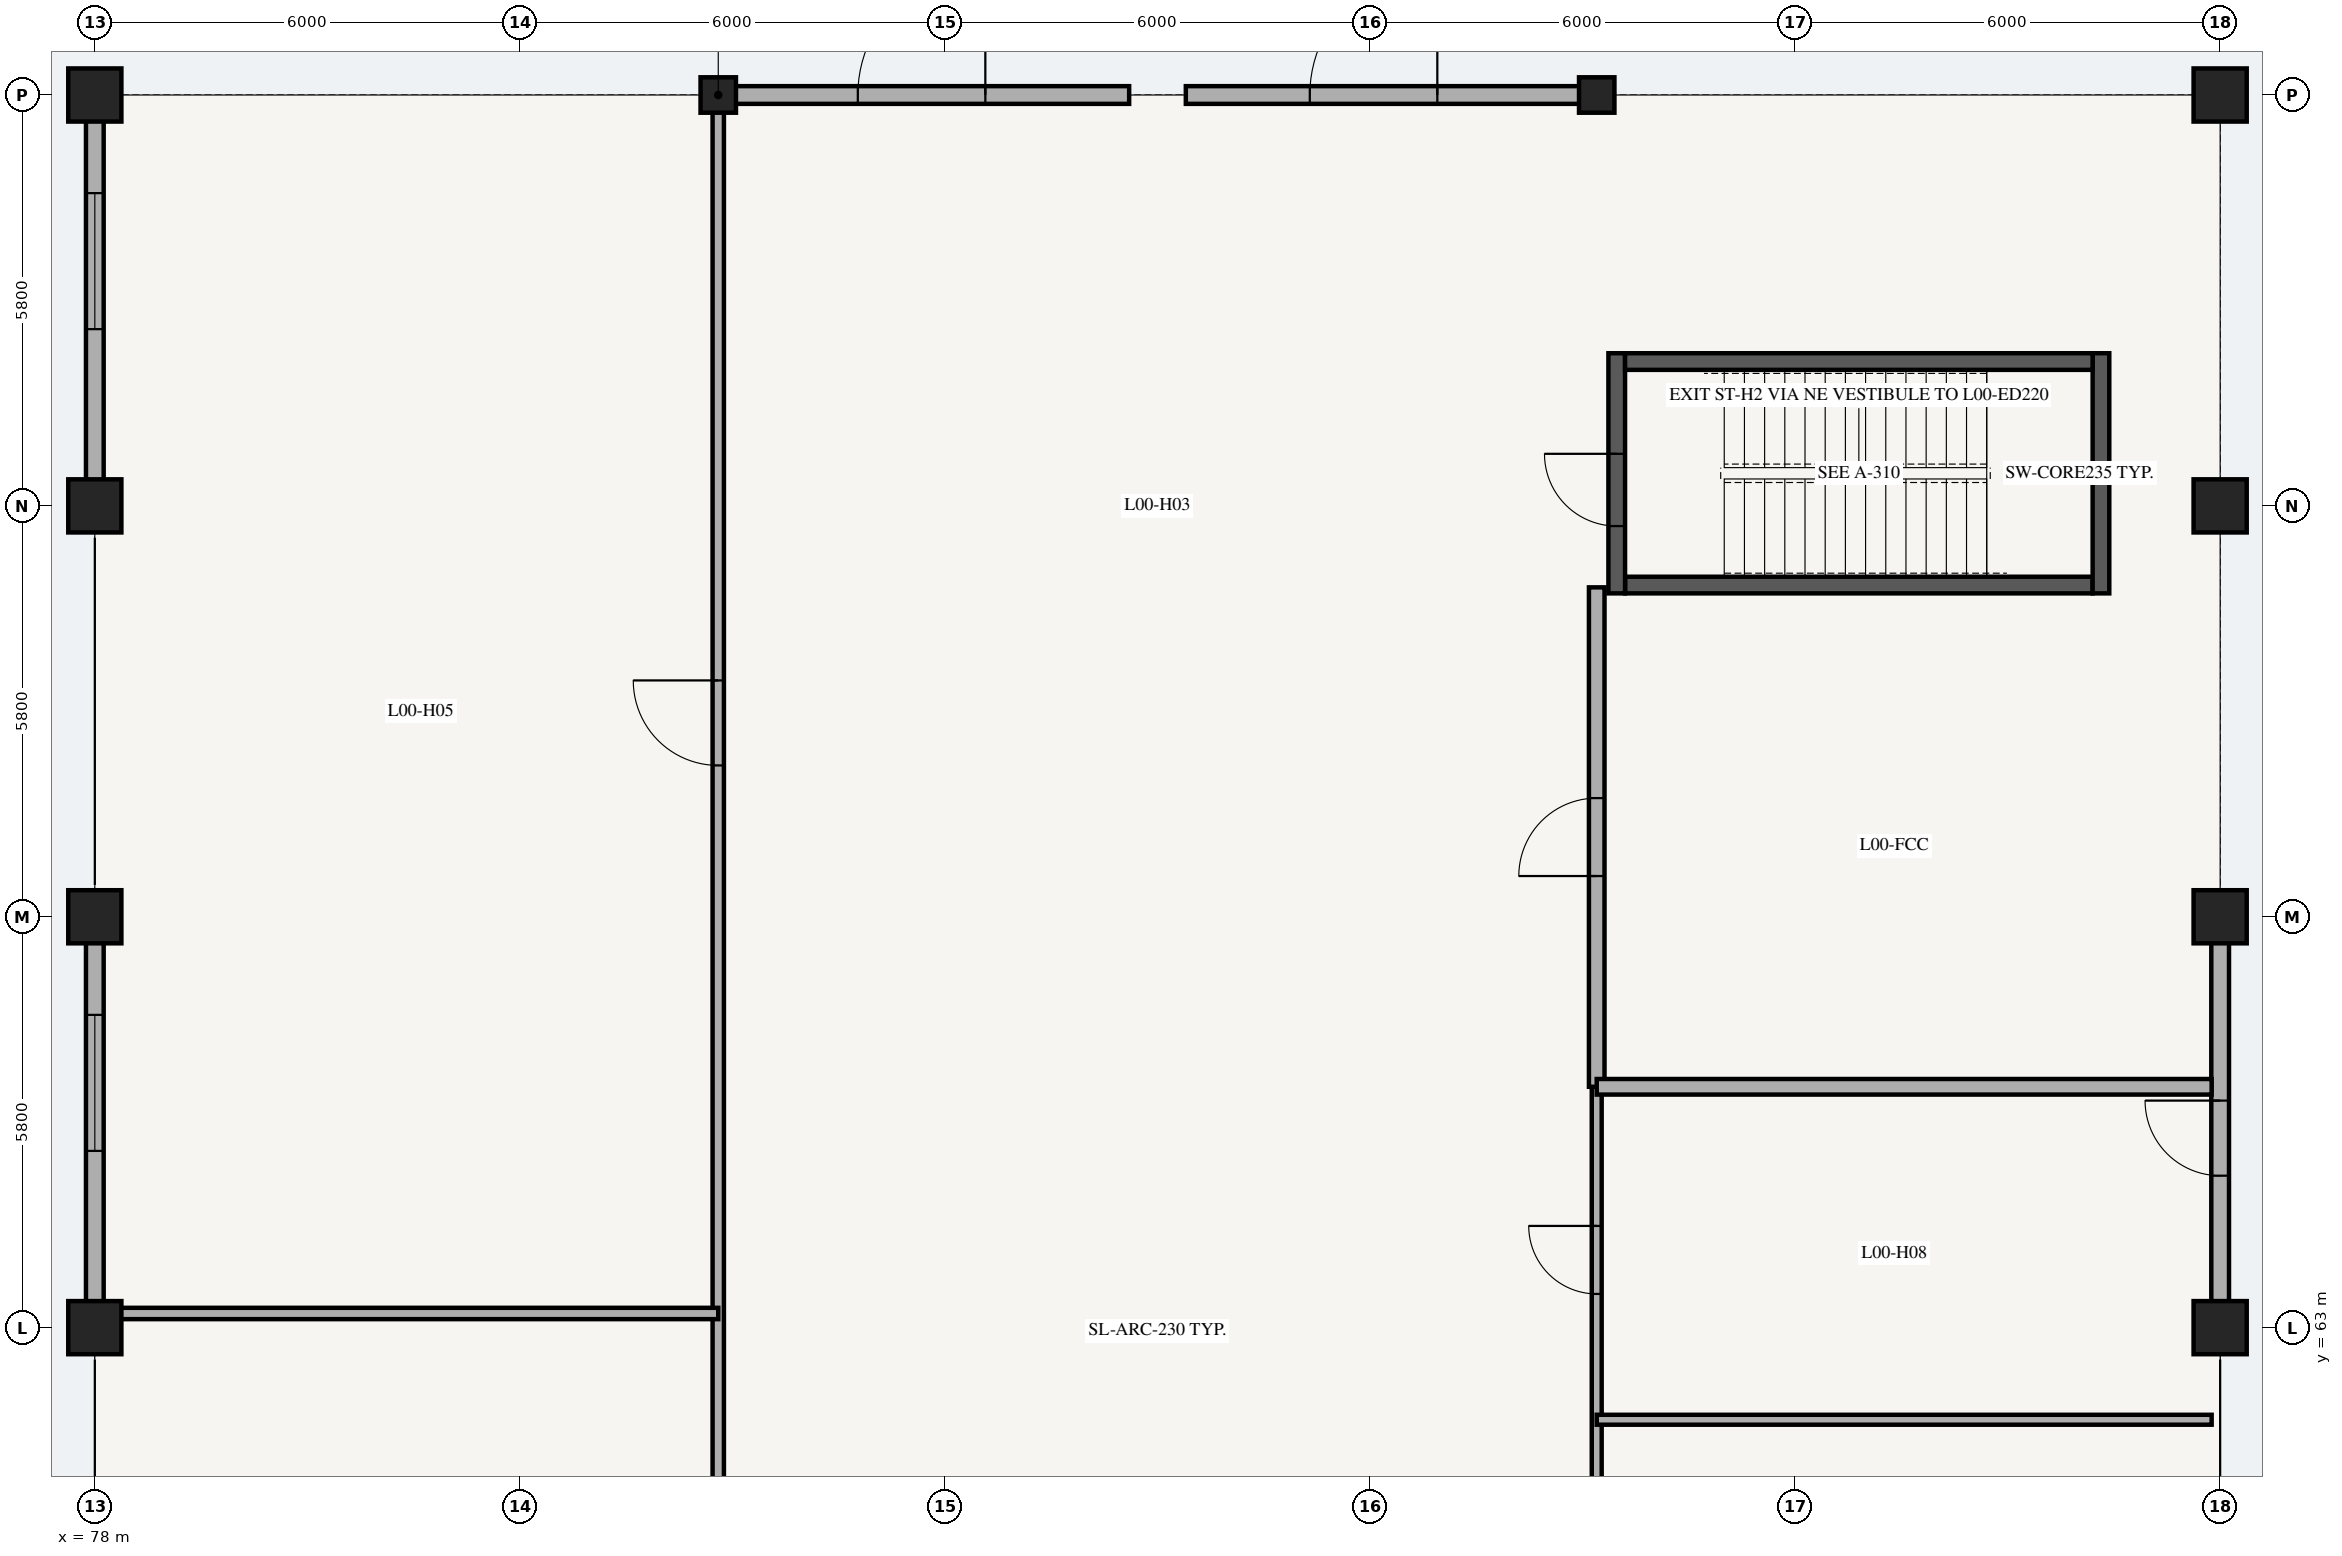
"""IFC4 building model, lengths in metres.
Left out: names, types, materials, properties, quantities, classifications, styles, units other than length and angle.
Written with IfcOpenShell. Run it as: python <this file> out.ifc"""

import sys

from ifc_helpers import new_model, si_unit, direction, frame, frame_2d, origin, origin_2d, place, context, subcontext, project, spatial, rectangle, extrude, element, fill, save


model = new_model("IFC4")
c1 = context("Model", 3, precision=1e-05, world=origin(), true_north=direction((0.0, 1.0)))
c2 = subcontext(c1, "Body", "Model", "MODEL_VIEW")
j1 = project(units=[si_unit("LENGTHUNIT", "METRE"), si_unit("PLANEANGLEUNIT", "RADIAN")], contexts=[c1])
p1 = place(None, origin())
s1 = spatial("IfcSite", under=j1, at=p1, CompositionType="ELEMENT")
p2 = place(p1, origin())
s2 = spatial("IfcBuilding", under=s1, at=p2, CompositionType="ELEMENT")
p3 = place(p2, origin())
s3 = spatial("IfcBuildingStorey", under=s2, at=p3, CompositionType="ELEMENT", Elevation=0.0)
p4 = place(p3, frame((99.6, 73.482, 0.0), z_axis=(0.0, 0.0, 1.0), x_axis=(1.0, 0.0, 0.0)))
e1 = element("IfcWall", 1, at=p4, inside=s3, PredefinedType="SHEAR", context=c2, shape_type="SweptSolid", body=[
    extrude(rectangle(XDim=6.6, YDim=0.235, at=frame_2d((3.3, 0.0))), origin(), (0.0, 0.0, 1.0), 4.465),
])
p5 = place(p3, frame((106.317, 73.365, 0.0), z_axis=(0.0, 0.0, 1.0), x_axis=(0.0, 1.0, 0.0)))
e2 = element("IfcWall", 2, at=p5, inside=s3, PredefinedType="SHEAR", context=c2, shape_type="SweptSolid", body=[
    extrude(rectangle(XDim=3.39, YDim=0.235, at=frame_2d((1.695, 0.0))), origin(), (0.0, 0.0, 1.0), 4.465),
])
p6 = place(p3, frame((99.482, 73.365, 0.0), z_axis=(0.0, 0.0, 1.0), x_axis=(0.0, 1.0, 0.0)))
e3 = element("IfcWall", 3, at=p6, inside=s3, PredefinedType="SHEAR", context=c2, shape_type="SweptSolid", body=[
    extrude(rectangle(XDim=3.39, YDim=0.235, at=frame_2d((1.695, 0.0))), origin(), (0.0, 0.0, 1.0), 4.465),
])
p7 = place(p6, frame((0.95, 0.0, 0.0)))
e4 = element("IfcOpeningElement", 4, at=p7, cuts=e3, PredefinedType="OPENING", context=c2, shape_type="SweptSolid", body=[
    extrude(rectangle(XDim=1.02, YDim=2.14, at=frame_2d((0.51, 1.07))), frame((0.0, 0.127, 0.0), z_axis=(0.0, -1.0, 0.0), x_axis=(1.0, 0.0, 0.0)), (0.0, 0.0, 1.0), 0.255),
])
p8 = place(p3, frame((99.6, 76.637, 0.0), z_axis=(0.0, 0.0, 1.0), x_axis=(1.0, 0.0, 0.0)))
e5 = element("IfcWall", 5, at=p8, inside=s3, PredefinedType="SHEAR", context=c2, shape_type="SweptSolid", body=[
    extrude(rectangle(XDim=6.6, YDim=0.235, at=frame_2d((3.3, 0.0))), origin(), (0.0, 0.0, 1.0), 4.465),
])
for number, where, z_axis, x_axis in (
    (6, (78.0, 63.0, 0.0), (0.0, 0.0, 1.0), (1.0, 0.0, 0.0)),
    (7, (78.0, 68.8, 0.0), (0.0, 0.0, 1.0), (1.0, 0.0, 0.0)),
    (8, (78.0, 74.6, 0.0), (0.0, 0.0, 1.0), (1.0, 0.0, 0.0)),
    (9, (78.0, 80.4, 0.0), (0.0, 0.0, 1.0), (1.0, 0.0, 0.0)),
):
    element("IfcColumn", number, at=place(p3, frame(where, z_axis=z_axis, x_axis=x_axis)), inside=s3, PredefinedType="COLUMN", context=c2, shape_type="SweptSolid", body=[
        extrude(rectangle(XDim=0.75, YDim=0.75, at=origin_2d()), origin(), (0.0, 0.0, 1.0), 4.465),
    ])
for number, where, z_axis, x_axis in (
    (10, (86.8, 80.4, 0.0), (0.0, 0.0, 1.0), (1.0, 0.0, 0.0)),
    (11, (99.2, 80.4, 0.0), (0.0, 0.0, 1.0), (1.0, 0.0, 0.0)),
):
    element("IfcColumn", number, at=place(p3, frame(where, z_axis=z_axis, x_axis=x_axis)), inside=s3, PredefinedType="COLUMN", context=c2, shape_type="SweptSolid", body=[
        extrude(rectangle(XDim=0.5, YDim=0.5, at=origin_2d()), origin(), (0.0, 0.0, 1.0), 4.465),
    ])
for number, where, z_axis, x_axis in (
    (12, (108.0, 63.0, 0.0), (0.0, 0.0, 1.0), (1.0, 0.0, 0.0)),
    (13, (108.0, 68.8, 0.0), (0.0, 0.0, 1.0), (1.0, 0.0, 0.0)),
    (14, (108.0, 74.6, 0.0), (0.0, 0.0, 1.0), (1.0, 0.0, 0.0)),
    (15, (108.0, 80.4, 0.0), (0.0, 0.0, 1.0), (1.0, 0.0, 0.0)),
):
    element("IfcColumn", number, at=place(p3, frame(where, z_axis=z_axis, x_axis=x_axis)), inside=s3, PredefinedType="COLUMN", context=c2, shape_type="SweptSolid", body=[
        extrude(rectangle(XDim=0.75, YDim=0.75, at=origin_2d()), origin(), (0.0, 0.0, 1.0), 4.465),
    ])
p9 = place(p3, frame((78.0, 63.345, 0.0), z_axis=(0.0, 0.0, 1.0), x_axis=(0.0, 1.0, 0.0)))
e16 = element("IfcWall", 16, at=p9, inside=s3, PredefinedType="SOLIDWALL", context=c2, shape_type="SweptSolid", body=[
    extrude(rectangle(XDim=5.11, YDim=0.25, at=frame_2d((2.555, 0.0))), origin(), (0.0, 0.0, 1.0), 3.75),
])
p10 = place(p9, frame((2.15, 0.0, 0.6)))
e17 = element("IfcOpeningElement", 17, at=p10, cuts=e16, PredefinedType="OPENING", context=c2, shape_type="SweptSolid", body=[
    extrude(rectangle(XDim=1.92, YDim=2.15, at=frame_2d((0.96, 1.075))), frame((0.0, 0.135, 0.0), z_axis=(0.0, -1.0, 0.0), x_axis=(1.0, 0.0, 0.0)), (0.0, 0.0, 1.0), 0.27),
])
p11 = place(p3, frame((108.0, 63.345, 0.0), z_axis=(0.0, 0.0, 1.0), x_axis=(0.0, 1.0, 0.0)))
e18 = element("IfcWall", 18, at=p11, inside=s3, PredefinedType="SOLIDWALL", context=c2, shape_type="SweptSolid", body=[
    extrude(rectangle(XDim=5.11, YDim=0.25, at=frame_2d((2.555, 0.0))), origin(), (0.0, 0.0, 1.0), 3.75),
])
p12 = place(p11, frame((1.8, 0.0, 0.0)))
e19 = element("IfcOpeningElement", 19, at=p12, cuts=e18, PredefinedType="OPENING", context=c2, shape_type="SweptSolid", body=[
    extrude(rectangle(XDim=1.06, YDim=2.15, at=frame_2d((0.53, 1.075))), frame((0.0, 0.135, 0.0), z_axis=(0.0, -1.0, 0.0), x_axis=(1.0, 0.0, 0.0)), (0.0, 0.0, 1.0), 0.27),
])
p13 = place(p3, frame((78.0, 74.945, 0.0), z_axis=(0.0, 0.0, 1.0), x_axis=(0.0, 1.0, 0.0)))
e20 = element("IfcWall", 20, at=p13, inside=s3, PredefinedType="SOLIDWALL", context=c2, shape_type="SweptSolid", body=[
    extrude(rectangle(XDim=5.11, YDim=0.25, at=frame_2d((2.555, 0.0))), origin(), (0.0, 0.0, 1.0), 3.75),
])
p14 = place(p13, frame((2.15, 0.0, 0.6)))
e21 = element("IfcOpeningElement", 21, at=p14, cuts=e20, PredefinedType="OPENING", context=c2, shape_type="SweptSolid", body=[
    extrude(rectangle(XDim=1.92, YDim=2.15, at=frame_2d((0.96, 1.075))), frame((0.0, 0.135, 0.0), z_axis=(0.0, -1.0, 0.0), x_axis=(1.0, 0.0, 0.0)), (0.0, 0.0, 1.0), 0.27),
])
p15 = place(p3, frame((87.02, 80.4, 0.0), z_axis=(0.0, 0.0, 1.0), x_axis=(1.0, 0.0, 0.0)))
e22 = element("IfcWall", 22, at=p15, inside=s3, PredefinedType="SOLIDWALL", context=c2, shape_type="SweptSolid", body=[
    extrude(rectangle(XDim=5.58, YDim=0.25, at=frame_2d((2.79, 0.0))), origin(), (0.0, 0.0, 1.0), 3.75),
])
p16 = place(p15, frame((1.75, 0.0, 0.0)))
e23 = element("IfcOpeningElement", 23, at=p16, cuts=e22, PredefinedType="OPENING", context=c2, shape_type="SweptSolid", body=[
    extrude(rectangle(XDim=1.8, YDim=2.3, at=frame_2d((0.9, 1.15))), frame((0.0, 0.135, 0.0), z_axis=(0.0, -1.0, 0.0), x_axis=(1.0, 0.0, 0.0)), (0.0, 0.0, 1.0), 0.27),
])
p17 = place(p3, frame((93.4, 80.4, 0.0), z_axis=(0.0, 0.0, 1.0), x_axis=(1.0, 0.0, 0.0)))
e24 = element("IfcWall", 24, at=p17, inside=s3, PredefinedType="SOLIDWALL", context=c2, shape_type="SweptSolid", body=[
    extrude(rectangle(XDim=5.58, YDim=0.25, at=frame_2d((2.79, 0.0))), origin(), (0.0, 0.0, 1.0), 3.75),
])
p18 = place(p17, frame((1.75, 0.0, 0.0)))
e25 = element("IfcOpeningElement", 25, at=p18, cuts=e24, PredefinedType="OPENING", context=c2, shape_type="SweptSolid", body=[
    extrude(rectangle(XDim=1.8, YDim=2.3, at=frame_2d((0.9, 1.15))), frame((0.0, 0.135, 0.0), z_axis=(0.0, -1.0, 0.0), x_axis=(1.0, 0.0, 0.0)), (0.0, 0.0, 1.0), 0.27),
])
p19 = place(p3, frame((86.8, 46.65, 0.0), z_axis=(0.0, 0.0, 1.0), x_axis=(0.0, 1.0, 0.0)))
e26 = element("IfcWall", 26, at=p19, inside=s3, PredefinedType="PARTITIONING", context=c2, shape_type="SweptSolid", body=[
    extrude(rectangle(XDim=33.63, YDim=0.16, at=frame_2d((16.815, 0.0))), origin(), (0.0, 0.0, 1.0), 3.52),
])
p20 = place(p19, frame((8.816, 0.0, 0.0)))
e27 = element("IfcOpeningElement", 27, at=p20, cuts=e26, PredefinedType="OPENING", context=c2, shape_type="SweptSolid", body=[
    extrude(rectangle(XDim=1.2, YDim=2.15, at=frame_2d((0.6, 1.075))), frame((0.0, 0.09, 0.0), z_axis=(0.0, -1.0, 0.0), x_axis=(1.0, 0.0, 0.0)), (0.0, 0.0, 1.0), 0.18),
])
p21 = place(p19, frame((24.286, 0.0, 0.0)))
e28 = element("IfcOpeningElement", 28, at=p21, cuts=e26, PredefinedType="OPENING", context=c2, shape_type="SweptSolid", body=[
    extrude(rectangle(XDim=1.2, YDim=2.15, at=frame_2d((0.6, 1.075))), frame((0.0, 0.09, 0.0), z_axis=(0.0, -1.0, 0.0), x_axis=(1.0, 0.0, 0.0)), (0.0, 0.0, 1.0), 0.18),
])
p22 = place(p3, frame((99.2, 47.6, 0.0), z_axis=(0.0, 0.0, 1.0), x_axis=(0.0, 1.0, 0.0)))
e29 = element("IfcWall", 29, at=p22, inside=s3, PredefinedType="PLUMBINGWALL", context=c2, shape_type="SweptSolid", body=[
    extrude(rectangle(XDim=18.8, YDim=0.14, at=frame_2d((9.4, 0.0))), origin(), (0.0, 0.0, 1.0), 3.52),
])
p23 = place(p22, frame((3.142, 0.0, 0.0)))
e30 = element("IfcOpeningElement", 30, at=p23, cuts=e29, PredefinedType="OPENING", context=c2, shape_type="SweptSolid", body=[
    extrude(rectangle(XDim=0.86, YDim=2.06, at=frame_2d((0.43, 1.03))), frame((0.0, 0.08, 0.0), z_axis=(0.0, -1.0, 0.0), x_axis=(1.0, 0.0, 0.0)), (0.0, 0.0, 1.0), 0.16),
])
p24 = place(p22, frame((10.286, 0.0, 0.0)))
e31 = element("IfcOpeningElement", 31, at=p24, cuts=e29, PredefinedType="OPENING", context=c2, shape_type="SweptSolid", body=[
    extrude(rectangle(XDim=0.86, YDim=2.06, at=frame_2d((0.43, 1.03))), frame((0.0, 0.08, 0.0), z_axis=(0.0, -1.0, 0.0), x_axis=(1.0, 0.0, 0.0)), (0.0, 0.0, 1.0), 0.16),
])
p25 = place(p22, frame((15.876, 0.0, 0.0)))
e32 = element("IfcOpeningElement", 32, at=p25, cuts=e29, PredefinedType="OPENING", context=c2, shape_type="SweptSolid", body=[
    extrude(rectangle(XDim=0.96, YDim=2.1, at=frame_2d((0.48, 1.05))), frame((0.0, 0.08, 0.0), z_axis=(0.0, -1.0, 0.0), x_axis=(1.0, 0.0, 0.0)), (0.0, 0.0, 1.0), 0.16),
])
p26 = place(p3, frame((99.2, 66.4, 0.0), z_axis=(0.0, 0.0, 1.0), x_axis=(0.0, 1.0, 0.0)))
e33 = element("IfcWall", 33, at=p26, inside=s3, PredefinedType="PARTITIONING", context=c2, shape_type="SweptSolid", body=[
    extrude(rectangle(XDim=7.05, YDim=0.22, at=frame_2d((3.525, 0.0))), origin(), (0.0, 0.0, 1.0), 3.52),
])
p27 = place(p26, frame((2.975, 0.0, 0.0)))
e34 = element("IfcOpeningElement", 34, at=p27, cuts=e33, PredefinedType="OPENING", context=c2, shape_type="SweptSolid", body=[
    extrude(rectangle(XDim=1.1, YDim=2.15, at=frame_2d((0.55, 1.075))), frame((0.0, 0.12, 0.0), z_axis=(0.0, -1.0, 0.0), x_axis=(1.0, 0.0, 0.0)), (0.0, 0.0, 1.0), 0.24),
])
p28 = place(p3, frame((99.2, 61.7, 0.0), z_axis=(0.0, 0.0, 1.0), x_axis=(1.0, 0.0, 0.0)))
e35 = element("IfcWall", 35, at=p28, inside=s3, PredefinedType="PLUMBINGWALL", context=c2, shape_type="SweptSolid", body=[
    extrude(rectangle(XDim=8.68, YDim=0.14, at=frame_2d((4.34, 0.0))), origin(), (0.0, 0.0, 1.0), 3.52),
])
p29 = place(p3, frame((99.2, 66.4, 0.0), z_axis=(0.0, 0.0, 1.0), x_axis=(1.0, 0.0, 0.0)))
e36 = element("IfcWall", 36, at=p29, inside=s3, PredefinedType="PARTITIONING", context=c2, shape_type="SweptSolid", body=[
    extrude(rectangle(XDim=8.68, YDim=0.22, at=frame_2d((4.34, 0.0))), origin(), (0.0, 0.0, 1.0), 3.52),
])
p30 = place(p3, frame((78.12, 63.2, 0.0), z_axis=(0.0, 0.0, 1.0), x_axis=(1.0, 0.0, 0.0)))
e37 = element("IfcWall", 37, at=p30, inside=s3, PredefinedType="PARTITIONING", context=c2, shape_type="SweptSolid", body=[
    extrude(rectangle(XDim=8.68, YDim=0.16, at=frame_2d((4.34, 0.0))), origin(), (0.0, 0.0, 1.0), 3.52),
])
p31 = place(p10, origin())
e38 = element("IfcWindow", 38, at=p31, inside=s3, PartitioningType="SINGLE_PANEL", PredefinedType="WINDOW", context=c2, shape_type="SweptSolid", body=[
    extrude(rectangle(XDim=1.92, YDim=2.15, at=frame_2d((0.96, 1.075))), frame((0.0, 0.03, 0.0), z_axis=(0.0, -1.0, 0.0), x_axis=(1.0, 0.0, 0.0)), (0.0, 0.0, 1.0), 0.06),
])
fill(e17, e38)
p32 = place(p12, origin())
e39 = element("IfcDoor", 39, at=p32, inside=s3, OperationType="SINGLE_SWING_RIGHT", PredefinedType="DOOR", context=c2, shape_type="SweptSolid", body=[
    extrude(rectangle(XDim=1.06, YDim=2.15, at=frame_2d((0.53, 1.075))), frame((0.0, 0.025, 0.0), z_axis=(0.0, -1.0, 0.0), x_axis=(1.0, 0.0, 0.0)), (0.0, 0.0, 1.0), 0.05),
])
fill(e19, e39)
p33 = place(p14, origin())
e40 = element("IfcWindow", 40, at=p33, inside=s3, PartitioningType="SINGLE_PANEL", PredefinedType="WINDOW", context=c2, shape_type="SweptSolid", body=[
    extrude(rectangle(XDim=1.92, YDim=2.15, at=frame_2d((0.96, 1.075))), frame((0.0, 0.03, 0.0), z_axis=(0.0, -1.0, 0.0), x_axis=(1.0, 0.0, 0.0)), (0.0, 0.0, 1.0), 0.06),
])
fill(e21, e40)
p34 = place(p16, origin())
e41 = element("IfcDoor", 41, at=p34, inside=s3, OperationType="DOUBLE_DOOR_SINGLE_SWING", PredefinedType="DOOR", context=c2, shape_type="SweptSolid", body=[
    extrude(rectangle(XDim=1.8, YDim=2.3, at=frame_2d((0.9, 1.15))), frame((0.0, 0.025, 0.0), z_axis=(0.0, -1.0, 0.0), x_axis=(1.0, 0.0, 0.0)), (0.0, 0.0, 1.0), 0.05),
])
fill(e23, e41)
p35 = place(p18, origin())
e42 = element("IfcDoor", 42, at=p35, inside=s3, OperationType="DOUBLE_DOOR_SINGLE_SWING", PredefinedType="DOOR", context=c2, shape_type="SweptSolid", body=[
    extrude(rectangle(XDim=1.8, YDim=2.3, at=frame_2d((0.9, 1.15))), frame((0.0, 0.025, 0.0), z_axis=(0.0, -1.0, 0.0), x_axis=(1.0, 0.0, 0.0)), (0.0, 0.0, 1.0), 0.05),
])
fill(e25, e42)
p36 = place(p7, origin())
e43 = element("IfcDoor", 43, at=p36, inside=s3, OperationType="SINGLE_SWING_RIGHT", PredefinedType="DOOR", context=c2, shape_type="SweptSolid", body=[
    extrude(rectangle(XDim=1.02, YDim=2.14, at=frame_2d((0.51, 1.07))), frame((0.0, 0.025, 0.0), z_axis=(0.0, -1.0, 0.0), x_axis=(1.0, 0.0, 0.0)), (0.0, 0.0, 1.0), 0.05),
])
fill(e4, e43)
p37 = place(p21, origin())
e44 = element("IfcDoor", 44, at=p37, inside=s3, OperationType="SINGLE_SWING_RIGHT", PredefinedType="DOOR", context=c2, shape_type="SweptSolid", body=[
    extrude(rectangle(XDim=1.2, YDim=2.15, at=frame_2d((0.6, 1.075))), frame((0.0, 0.025, 0.0), z_axis=(0.0, -1.0, 0.0), x_axis=(1.0, 0.0, 0.0)), (0.0, 0.0, 1.0), 0.05),
])
fill(e28, e44)
p38 = place(p25, origin())
e45 = element("IfcDoor", 45, at=p38, inside=s3, OperationType="SINGLE_SWING_RIGHT", PredefinedType="DOOR", context=c2, shape_type="SweptSolid", body=[
    extrude(rectangle(XDim=0.96, YDim=2.1, at=frame_2d((0.48, 1.05))), frame((0.0, 0.025, 0.0), z_axis=(0.0, -1.0, 0.0), x_axis=(1.0, 0.0, 0.0)), (0.0, 0.0, 1.0), 0.05),
])
fill(e32, e45)
p39 = place(p27, origin())
e46 = element("IfcDoor", 46, at=p39, inside=s3, OperationType="SINGLE_SWING_LEFT", PredefinedType="DOOR", context=c2, shape_type="SweptSolid", body=[
    extrude(rectangle(XDim=1.1, YDim=2.15, at=frame_2d((0.55, 1.075))), frame((0.0, 0.025, 0.0), z_axis=(0.0, -1.0, 0.0), x_axis=(1.0, 0.0, 0.0)), (0.0, 0.0, 1.0), 0.05),
])
fill(e34, e46)
save(model, sys.argv[1])
